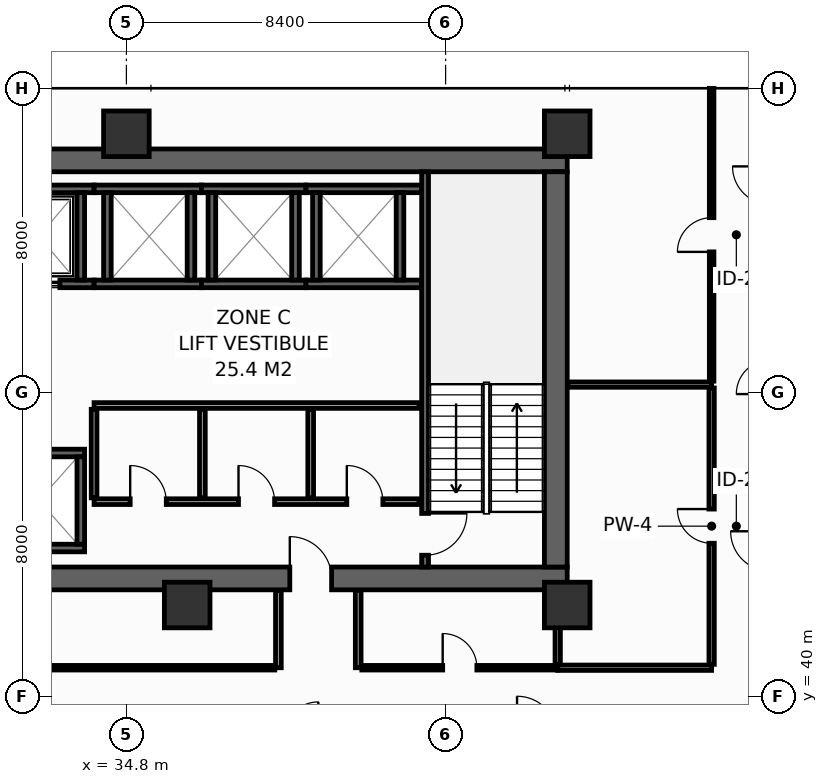
"""IFC4 building model, lengths in metres.
Left out: names, types, materials, properties, quantities, classifications, styles, units other than length and angle.
Written with IfcOpenShell. Run it as: python <this file> out.ifc"""

import sys

from ifc_helpers import new_model, si_unit, direction, frame, frame_2d, origin, origin_2d, place, context, subcontext, project, spatial, rectangle, hollow_rectangle, extrude, element, fill, save


model = new_model("IFC4")
c1 = context("Model", 3, precision=1e-05, world=origin(), true_north=direction((0.0, 1.0)))
c2 = subcontext(c1, "Body", "Model", "MODEL_VIEW")
j1 = project(units=[si_unit("LENGTHUNIT", "METRE"), si_unit("PLANEANGLEUNIT", "RADIAN")], contexts=[c1])
p1 = place(None, origin())
s1 = spatial("IfcSite", under=j1, at=p1, CompositionType="ELEMENT")
p2 = place(p1, origin())
s2 = spatial("IfcBuilding", under=s1, at=p2, CompositionType="ELEMENT")
p3 = place(p2, frame((0.0, 0.0, 38.4)))
s3 = spatial("IfcBuildingStorey", under=s2, at=p3, CompositionType="ELEMENT", Elevation=38.4)
p4 = place(p3, frame((13.5, 43.1, 0.0), z_axis=(0.0, 0.0, 1.0), x_axis=(1.0, 0.0, 0.0)))
e1 = element("IfcWall", 1, at=p4, inside=s3, PredefinedType="SHEAR", context=c2, shape_type="SweptSolid", body=[
    extrude(rectangle(XDim=32.9, YDim=0.6, at=frame_2d((16.45, 0.0))), origin(), (0.0, 0.0, 1.0), 4.15),
])
p5 = place(p4, frame((5.4, 0.0, 0.0)))
e2 = element("IfcOpeningElement", 2, at=p5, cuts=e1, PredefinedType="OPENING", context=c2, shape_type="SweptSolid", body=[
    extrude(rectangle(XDim=1.1, YDim=2.15, at=frame_2d((0.55, 1.075))), frame((0.0, 0.31, 0.0), z_axis=(0.0, -1.0, 0.0), x_axis=(1.0, 0.0, 0.0)), (0.0, 0.0, 1.0), 0.62),
])
p6 = place(p4, frame((25.6, 0.0, 0.0)))
e3 = element("IfcOpeningElement", 3, at=p6, cuts=e1, PredefinedType="OPENING", context=c2, shape_type="SweptSolid", body=[
    extrude(rectangle(XDim=1.1, YDim=2.15, at=frame_2d((0.55, 1.075))), frame((0.0, 0.31, 0.0), z_axis=(0.0, -1.0, 0.0), x_axis=(1.0, 0.0, 0.0)), (0.0, 0.0, 1.0), 0.62),
])
p7 = place(p3, frame((13.5, 54.1, 0.0), z_axis=(0.0, 0.0, 1.0), x_axis=(1.0, 0.0, 0.0)))
e4 = element("IfcWall", 4, at=p7, inside=s3, PredefinedType="SHEAR", context=c2, shape_type="SweptSolid", body=[
    extrude(rectangle(XDim=32.9, YDim=0.6, at=frame_2d((16.45, 0.0))), origin(), (0.0, 0.0, 1.0), 4.15),
])
p8 = place(p3, frame((46.1, 43.4, 0.0), z_axis=(0.0, 0.0, 1.0), x_axis=(0.0, 1.0, 0.0)))
e5 = element("IfcWall", 5, at=p8, inside=s3, PredefinedType="SHEAR", context=c2, shape_type="SweptSolid", body=[
    extrude(rectangle(XDim=10.4, YDim=0.6, at=frame_2d((5.2, 0.0))), origin(), (0.0, 0.0, 1.0), 4.15),
])
for number, where, z_axis, x_axis in (
    (6, (34.8, 54.8, 0.0), (0.0, 0.0, 1.0), (1.0, 0.0, 0.0)),
    (7, (46.4, 54.8, 0.0), (0.0, 0.0, 1.0), (1.0, 0.0, 0.0)),
    (8, (36.4, 42.4, 0.0), (0.0, 0.0, 1.0), (1.0, 0.0, 0.0)),
    (9, (46.4, 42.4, 0.0), (0.0, 0.0, 1.0), (1.0, 0.0, 0.0)),
):
    element("IfcColumn", number, at=place(p3, frame(where, z_axis=z_axis, x_axis=x_axis)), inside=s3, PredefinedType="COLUMN", context=c2, shape_type="SweptSolid", body=[
        extrude(hollow_rectangle(XDim=1.2, YDim=1.2, WallThickness=0.055, at=origin_2d()), origin(), (0.0, 0.0, 1.0), 4.4),
    ])
p9 = place(p3, frame((31.125, 50.85, 0.0), z_axis=(0.0, 0.0, 1.0), x_axis=(1.0, 0.0, 0.0)))
e10 = element("IfcWall", 10, at=p9, inside=s3, PredefinedType="SHEAR", context=c2, shape_type="SweptSolid", body=[
    extrude(rectangle(XDim=2.825, YDim=0.2, at=frame_2d((1.413, 0.0))), origin(), (0.0, 0.0, 1.0), 4.15),
])
p10 = place(p9, frame((0.825, 0.0, 0.0)))
e11 = element("IfcOpeningElement", 11, at=p10, cuts=e10, PredefinedType="OPENING", context=c2, shape_type="SweptSolid", body=[
    extrude(rectangle(XDim=1.1, YDim=2.2, at=frame_2d((0.55, 1.1))), frame((0.0, 0.11, 0.0), z_axis=(0.0, -1.0, 0.0), x_axis=(1.0, 0.0, 0.0)), (0.0, 0.0, 1.0), 0.22),
])
p11 = place(p3, frame((31.125, 53.35, 0.0), z_axis=(0.0, 0.0, 1.0), x_axis=(1.0, 0.0, 0.0)))
e12 = element("IfcWall", 12, at=p11, inside=s3, PredefinedType="SHEAR", context=c2, shape_type="SweptSolid", body=[
    extrude(rectangle(XDim=2.825, YDim=0.2, at=frame_2d((1.413, 0.0))), origin(), (0.0, 0.0, 1.0), 4.15),
])
p12 = place(p3, frame((33.6, 50.95, 0.0), z_axis=(0.0, 0.0, 1.0), x_axis=(0.0, 1.0, 0.0)))
e13 = element("IfcWall", 13, at=p12, inside=s3, PredefinedType="SHEAR", context=c2, shape_type="SweptSolid", body=[
    extrude(rectangle(XDim=2.3, YDim=0.2, at=frame_2d((1.15, 0.0))), origin(), (0.0, 0.0, 1.0), 4.15),
])
for number, where, z_axis, x_axis in (
    (14, (31.125, 43.9, 0.0), (0.0, 0.0, 1.0), (1.0, 0.0, 0.0)),
    (15, (31.125, 46.4, 0.0), (0.0, 0.0, 1.0), (1.0, 0.0, 0.0)),
):
    element("IfcWall", number, at=place(p3, frame(where, z_axis=z_axis, x_axis=x_axis)), inside=s3, PredefinedType="SHEAR", context=c2, shape_type="SweptSolid", body=[
        extrude(rectangle(XDim=2.575, YDim=0.2, at=frame_2d((1.288, 0.0))), origin(), (0.0, 0.0, 1.0), 4.15),
    ])
p13 = place(p3, frame((33.6, 44.0, 0.0), z_axis=(0.0, 0.0, 1.0), x_axis=(0.0, 1.0, 0.0)))
e16 = element("IfcWall", 16, at=p13, inside=s3, PredefinedType="SHEAR", context=c2, shape_type="SweptSolid", body=[
    extrude(rectangle(XDim=2.3, YDim=0.2, at=frame_2d((1.15, 0.0))), origin(), (0.0, 0.0, 1.0), 4.15),
])
for number, where, z_axis, x_axis in (
    (17, (33.95, 50.85, 0.0), (0.0, 0.0, 1.0), (1.0, 0.0, 0.0)),
    (18, (33.95, 53.35, 0.0), (0.0, 0.0, 1.0), (1.0, 0.0, 0.0)),
):
    element("IfcWall", number, at=place(p3, frame(where, z_axis=z_axis, x_axis=x_axis)), inside=s3, PredefinedType="SHEAR", context=c2, shape_type="SweptSolid", body=[
        extrude(rectangle(XDim=2.825, YDim=0.2, at=frame_2d((1.413, 0.0))), origin(), (0.0, 0.0, 1.0), 4.15),
    ])
for number, where, z_axis, x_axis in (
    (19, (34.3, 50.95, 0.0), (0.0, 0.0, 1.0), (0.0, 1.0, 0.0)),
    (20, (36.5, 50.95, 0.0), (0.0, 0.0, 1.0), (0.0, 1.0, 0.0)),
):
    element("IfcWall", number, at=place(p3, frame(where, z_axis=z_axis, x_axis=x_axis)), inside=s3, PredefinedType="SHEAR", context=c2, shape_type="SweptSolid", body=[
        extrude(rectangle(XDim=2.3, YDim=0.2, at=frame_2d((1.15, 0.0))), origin(), (0.0, 0.0, 1.0), 4.15),
    ])
for number, where, z_axis, x_axis in (
    (21, (36.775, 50.85, 0.0), (0.0, 0.0, 1.0), (1.0, 0.0, 0.0)),
    (22, (36.775, 53.35, 0.0), (0.0, 0.0, 1.0), (1.0, 0.0, 0.0)),
):
    element("IfcWall", number, at=place(p3, frame(where, z_axis=z_axis, x_axis=x_axis)), inside=s3, PredefinedType="SHEAR", context=c2, shape_type="SweptSolid", body=[
        extrude(rectangle(XDim=2.75, YDim=0.2, at=frame_2d((1.375, 0.0))), origin(), (0.0, 0.0, 1.0), 4.15),
    ])
for number, where, z_axis, x_axis in (
    (23, (37.05, 50.95, 0.0), (0.0, 0.0, 1.0), (0.0, 1.0, 0.0)),
    (24, (39.25, 50.95, 0.0), (0.0, 0.0, 1.0), (0.0, 1.0, 0.0)),
):
    element("IfcWall", number, at=place(p3, frame(where, z_axis=z_axis, x_axis=x_axis)), inside=s3, PredefinedType="SHEAR", context=c2, shape_type="SweptSolid", body=[
        extrude(rectangle(XDim=2.3, YDim=0.2, at=frame_2d((1.15, 0.0))), origin(), (0.0, 0.0, 1.0), 4.15),
    ])
for number, where, z_axis, x_axis in (
    (25, (39.525, 50.85, 0.0), (0.0, 0.0, 1.0), (1.0, 0.0, 0.0)),
    (26, (39.525, 53.35, 0.0), (0.0, 0.0, 1.0), (1.0, 0.0, 0.0)),
):
    element("IfcWall", number, at=place(p3, frame(where, z_axis=z_axis, x_axis=x_axis)), inside=s3, PredefinedType="SHEAR", context=c2, shape_type="SweptSolid", body=[
        extrude(rectangle(XDim=3.045, YDim=0.2, at=frame_2d((1.522, 0.0))), origin(), (0.0, 0.0, 1.0), 4.15),
    ])
for number, where, z_axis, x_axis in (
    (27, (39.8, 50.95, 0.0), (0.0, 0.0, 1.0), (0.0, 1.0, 0.0)),
    (28, (42.0, 50.95, 0.0), (0.0, 0.0, 1.0), (0.0, 1.0, 0.0)),
):
    element("IfcWall", number, at=place(p3, frame(where, z_axis=z_axis, x_axis=x_axis)), inside=s3, PredefinedType="SHEAR", context=c2, shape_type="SweptSolid", body=[
        extrude(rectangle(XDim=2.3, YDim=0.2, at=frame_2d((1.15, 0.0))), origin(), (0.0, 0.0, 1.0), 4.15),
    ])
p14 = place(p3, frame((42.66, 53.8, 0.0), z_axis=(0.0, 0.0, 1.0), x_axis=(0.0, -1.0, 0.0)))
e29 = element("IfcWall", 29, at=p14, inside=s3, PredefinedType="SHEAR", context=c2, shape_type="SweptSolid", body=[
    extrude(rectangle(XDim=10.4, YDim=0.18, at=frame_2d((5.2, 0.0))), origin(), (0.0, 0.0, 1.0), 4.15),
])
p15 = place(p14, frame((8.99, 0.0, 0.0)))
e30 = element("IfcOpeningElement", 30, at=p15, cuts=e29, PredefinedType="OPENING", context=c2, shape_type="SweptSolid", body=[
    extrude(rectangle(XDim=1.1, YDim=2.15, at=frame_2d((0.55, 1.075))), frame((0.0, 0.1, 0.0), z_axis=(0.0, -1.0, 0.0), x_axis=(1.0, 0.0, 0.0)), (0.0, 0.0, 1.0), 0.2),
])
p16 = place(p3, frame((33.95, 45.12, 0.0), z_axis=(0.0, 0.0, 1.0), x_axis=(1.0, 0.0, 0.0)))
e31 = element("IfcWall", 31, at=p16, inside=s3, PredefinedType="PARTITIONING", context=c2, shape_type="SweptSolid", body=[
    extrude(rectangle(XDim=8.55, YDim=0.15, at=frame_2d((4.275, 0.0))), origin(), (0.0, 0.0, 1.0), 4.15),
])
p17 = place(p16, frame((0.95, 0.0, 0.0)))
e32 = element("IfcOpeningElement", 32, at=p17, cuts=e31, PredefinedType="OPENING", context=c2, shape_type="SweptSolid", body=[
    extrude(rectangle(XDim=0.95, YDim=2.15, at=frame_2d((0.475, 1.075))), frame((0.0, 0.085, 0.0), z_axis=(0.0, -1.0, 0.0), x_axis=(1.0, 0.0, 0.0)), (0.0, 0.0, 1.0), 0.17),
])
p18 = place(p16, frame((3.8, 0.0, 0.0)))
e33 = element("IfcOpeningElement", 33, at=p18, cuts=e31, PredefinedType="OPENING", context=c2, shape_type="SweptSolid", body=[
    extrude(rectangle(XDim=0.95, YDim=2.15, at=frame_2d((0.475, 1.075))), frame((0.0, 0.085, 0.0), z_axis=(0.0, -1.0, 0.0), x_axis=(1.0, 0.0, 0.0)), (0.0, 0.0, 1.0), 0.17),
])
p19 = place(p16, frame((6.65, 0.0, 0.0)))
e34 = element("IfcOpeningElement", 34, at=p19, cuts=e31, PredefinedType="OPENING", context=c2, shape_type="SweptSolid", body=[
    extrude(rectangle(XDim=0.95, YDim=2.15, at=frame_2d((0.475, 1.075))), frame((0.0, 0.085, 0.0), z_axis=(0.0, -1.0, 0.0), x_axis=(1.0, 0.0, 0.0)), (0.0, 0.0, 1.0), 0.17),
])
p20 = place(p3, frame((33.95, 47.65, 0.0), z_axis=(0.0, 0.0, 1.0), x_axis=(1.0, 0.0, 0.0)))
e35 = element("IfcWall", 35, at=p20, inside=s3, PredefinedType="PARTITIONING", context=c2, shape_type="SweptSolid", body=[
    extrude(rectangle(XDim=8.55, YDim=0.15, at=frame_2d((4.275, 0.0))), origin(), (0.0, 0.0, 1.0), 4.15),
])
for number, where, z_axis, x_axis in (
    (36, (33.95, 45.22, 0.0), (0.0, 0.0, 1.0), (0.0, 1.0, 0.0)),
    (37, (36.8, 45.22, 0.0), (0.0, 0.0, 1.0), (0.0, 1.0, 0.0)),
    (38, (39.65, 45.22, 0.0), (0.0, 0.0, 1.0), (0.0, 1.0, 0.0)),
):
    element("IfcWall", number, at=place(p3, frame(where, z_axis=z_axis, x_axis=x_axis)), inside=s3, PredefinedType="PARTITIONING", context=c2, shape_type="SweptSolid", body=[
        extrude(rectangle(XDim=2.33, YDim=0.15, at=frame_2d((1.165, 0.0))), origin(), (0.0, 0.0, 1.0), 4.15),
    ])
p21 = place(p3, frame((46.15, 40.75, 0.0), z_axis=(0.0, 0.0, 1.0), x_axis=(1.0, 0.0, 0.0)))
e39 = element("IfcWall", 39, at=p21, inside=s3, PredefinedType="PARTITIONING", context=c2, shape_type="SweptSolid", body=[
    extrude(rectangle(XDim=4.05, YDim=0.14, at=frame_2d((2.025, 0.0))), origin(), (0.0, 0.0, 1.0), 4.15),
])
p22 = place(p3, frame((46.15, 40.84, 0.0), z_axis=(0.0, 0.0, 1.0), x_axis=(0.0, 1.0, 0.0)))
e40 = element("IfcWall", 40, at=p22, inside=s3, PredefinedType="PARTITIONING", context=c2, shape_type="SweptSolid", body=[
    extrude(rectangle(XDim=1.94, YDim=0.14, at=frame_2d((0.97, 0.0))), origin(), (0.0, 0.0, 1.0), 4.15),
])
p23 = place(p3, frame((46.42, 48.2, 0.0), z_axis=(0.0, 0.0, 1.0), x_axis=(1.0, 0.0, 0.0)))
e41 = element("IfcWall", 41, at=p23, inside=s3, PredefinedType="PARTITIONING", context=c2, shape_type="SweptSolid", body=[
    extrude(rectangle(XDim=3.78, YDim=0.14, at=frame_2d((1.89, 0.0))), origin(), (0.0, 0.0, 1.0), 4.15),
])
p24 = place(p3, frame((50.2, 40.84, 0.0), z_axis=(0.0, 0.0, 1.0), x_axis=(0.0, 1.0, 0.0)))
e42 = element("IfcWall", 42, at=p24, inside=s3, PredefinedType="PARTITIONING", context=c2, shape_type="SweptSolid", body=[
    extrude(rectangle(XDim=7.27, YDim=0.14, at=frame_2d((3.635, 0.0))), origin(), (0.0, 0.0, 1.0), 3.335),
])
p25 = place(p24, frame((3.185, 0.0, 0.0)))
e43 = element("IfcOpeningElement", 43, at=p25, cuts=e42, PredefinedType="OPENING", context=c2, shape_type="SweptSolid", body=[
    extrude(rectangle(XDim=0.9, YDim=2.1, at=frame_2d((0.45, 1.05))), frame((0.0, 0.08, 0.0), z_axis=(0.0, -1.0, 0.0), x_axis=(1.0, 0.0, 0.0)), (0.0, 0.0, 1.0), 0.16),
])
p26 = place(p3, frame((50.2, 48.29, 0.0), z_axis=(0.0, 0.0, 1.0), x_axis=(0.0, 1.0, 0.0)))
e44 = element("IfcWall", 44, at=p26, inside=s3, PredefinedType="PARTITIONING", context=c2, shape_type="SweptSolid", body=[
    extrude(rectangle(XDim=7.705, YDim=0.12, at=frame_2d((3.853, 0.0))), origin(), (0.0, 0.0, 1.0), 3.435),
])
p27 = place(p26, frame((3.402, 0.0, 0.0)))
e45 = element("IfcOpeningElement", 45, at=p27, cuts=e44, PredefinedType="OPENING", context=c2, shape_type="SweptSolid", body=[
    extrude(rectangle(XDim=0.9, YDim=2.1, at=frame_2d((0.45, 1.05))), frame((0.0, 0.07, 0.0), z_axis=(0.0, -1.0, 0.0), x_axis=(1.0, 0.0, 0.0)), (0.0, 0.0, 1.0), 0.14),
])
for number, where, z_axis, x_axis in (
    (46, (38.8, 40.75, 0.0), (0.0, 0.0, 1.0), (0.0, 1.0, 0.0)),
    (47, (40.9, 40.75, 0.0), (0.0, 0.0, 1.0), (0.0, 1.0, 0.0)),
):
    element("IfcWall", number, at=place(p3, frame(where, z_axis=z_axis, x_axis=x_axis)), inside=s3, PredefinedType="PARTITIONING", context=c2, shape_type="SweptSolid", body=[
        extrude(rectangle(XDim=2.03, YDim=0.15, at=frame_2d((1.015, 0.0))), origin(), (0.0, 0.0, 1.0), 4.15),
    ])
p28 = place(p3, frame((20.795, 40.75, 0.0), z_axis=(0.0, 0.0, 1.0), x_axis=(1.0, 0.0, 0.0)))
e48 = element("IfcWall", 48, at=p28, inside=s3, PredefinedType="PARTITIONING", context=c2, shape_type="SweptSolid", body=[
    extrude(rectangle(XDim=17.91, YDim=0.12, at=frame_2d((8.955, 0.0))), origin(), (0.0, 0.0, 1.0), 3.335),
])
p29 = place(p28, frame((8.505, 0.0, 0.0)))
e49 = element("IfcOpeningElement", 49, at=p29, cuts=e48, PredefinedType="OPENING", context=c2, shape_type="SweptSolid", body=[
    extrude(rectangle(XDim=0.9, YDim=2.1, at=frame_2d((0.45, 1.05))), frame((0.0, 0.07, 0.0), z_axis=(0.0, -1.0, 0.0), x_axis=(1.0, 0.0, 0.0)), (0.0, 0.0, 1.0), 0.14),
])
p30 = place(p3, frame((40.995, 40.75, 0.0), z_axis=(0.0, 0.0, 1.0), x_axis=(1.0, 0.0, 0.0)))
e50 = element("IfcWall", 50, at=p30, inside=s3, PredefinedType="PARTITIONING", context=c2, shape_type="SweptSolid", body=[
    extrude(rectangle(XDim=5.155, YDim=0.12, at=frame_2d((2.577, 0.0))), origin(), (0.0, 0.0, 1.0), 4.15),
])
p31 = place(p30, frame((2.128, 0.0, 0.0)))
e51 = element("IfcOpeningElement", 51, at=p31, cuts=e50, PredefinedType="OPENING", context=c2, shape_type="SweptSolid", body=[
    extrude(rectangle(XDim=0.9, YDim=2.1, at=frame_2d((0.45, 1.05))), frame((0.0, 0.07, 0.0), z_axis=(0.0, -1.0, 0.0), x_axis=(1.0, 0.0, 0.0)), (0.0, 0.0, 1.0), 0.14),
])
p32 = place(p10, origin())
e52 = element("IfcDoor", 52, at=p32, inside=s3, OperationType="SLIDING_TO_LEFT", PredefinedType="DOOR", context=c2, shape_type="SweptSolid", body=[
    extrude(rectangle(XDim=1.1, YDim=2.2, at=frame_2d((0.55, 1.1))), frame((0.0, 0.025, 0.0), z_axis=(0.0, -1.0, 0.0), x_axis=(1.0, 0.0, 0.0)), (0.0, 0.0, 1.0), 0.05),
])
fill(e11, e52)
p33 = place(p15, origin())
e53 = element("IfcDoor", 53, at=p33, inside=s3, OperationType="SINGLE_SWING_LEFT", PredefinedType="DOOR", context=c2, shape_type="SweptSolid", body=[
    extrude(rectangle(XDim=1.1, YDim=2.15, at=frame_2d((0.55, 1.075))), frame((0.0, 0.025, 0.0), z_axis=(0.0, -1.0, 0.0), x_axis=(1.0, 0.0, 0.0)), (0.0, 0.0, 1.0), 0.05),
])
fill(e30, e53)
p34 = place(p6, origin())
e54 = element("IfcDoor", 54, at=p34, inside=s3, OperationType="SINGLE_SWING_LEFT", PredefinedType="DOOR", context=c2, shape_type="SweptSolid", body=[
    extrude(rectangle(XDim=1.1, YDim=2.15, at=frame_2d((0.55, 1.075))), frame((0.0, 0.025, 0.0), z_axis=(0.0, -1.0, 0.0), x_axis=(1.0, 0.0, 0.0)), (0.0, 0.0, 1.0), 0.05),
])
fill(e3, e54)
p35 = place(p17, origin())
e55 = element("IfcDoor", 55, at=p35, inside=s3, OperationType="SINGLE_SWING_LEFT", PredefinedType="DOOR", context=c2, shape_type="SweptSolid", body=[
    extrude(rectangle(XDim=0.95, YDim=2.15, at=frame_2d((0.475, 1.075))), frame((0.0, 0.025, 0.0), z_axis=(0.0, -1.0, 0.0), x_axis=(1.0, 0.0, 0.0)), (0.0, 0.0, 1.0), 0.05),
])
fill(e32, e55)
p36 = place(p18, origin())
e56 = element("IfcDoor", 56, at=p36, inside=s3, OperationType="SINGLE_SWING_LEFT", PredefinedType="DOOR", context=c2, shape_type="SweptSolid", body=[
    extrude(rectangle(XDim=0.95, YDim=2.15, at=frame_2d((0.475, 1.075))), frame((0.0, 0.025, 0.0), z_axis=(0.0, -1.0, 0.0), x_axis=(1.0, 0.0, 0.0)), (0.0, 0.0, 1.0), 0.05),
])
fill(e33, e56)
p37 = place(p19, origin())
e57 = element("IfcDoor", 57, at=p37, inside=s3, OperationType="SINGLE_SWING_LEFT", PredefinedType="DOOR", context=c2, shape_type="SweptSolid", body=[
    extrude(rectangle(XDim=0.95, YDim=2.15, at=frame_2d((0.475, 1.075))), frame((0.0, 0.025, 0.0), z_axis=(0.0, -1.0, 0.0), x_axis=(1.0, 0.0, 0.0)), (0.0, 0.0, 1.0), 0.05),
])
fill(e34, e57)
p38 = place(p25, origin())
e58 = element("IfcDoor", 58, at=p38, inside=s3, OperationType="SINGLE_SWING_RIGHT", PredefinedType="DOOR", context=c2, shape_type="SweptSolid", body=[
    extrude(rectangle(XDim=0.9, YDim=2.1, at=frame_2d((0.45, 1.05))), frame((0.0, 0.025, 0.0), z_axis=(0.0, -1.0, 0.0), x_axis=(1.0, 0.0, 0.0)), (0.0, 0.0, 1.0), 0.05),
])
fill(e43, e58)
p39 = place(p27, origin())
e59 = element("IfcDoor", 59, at=p39, inside=s3, OperationType="SINGLE_SWING_LEFT", PredefinedType="DOOR", context=c2, shape_type="SweptSolid", body=[
    extrude(rectangle(XDim=0.9, YDim=2.1, at=frame_2d((0.45, 1.05))), frame((0.0, 0.025, 0.0), z_axis=(0.0, -1.0, 0.0), x_axis=(1.0, 0.0, 0.0)), (0.0, 0.0, 1.0), 0.05),
])
fill(e45, e59)
p40 = place(p31, origin())
e60 = element("IfcDoor", 60, at=p40, inside=s3, OperationType="SINGLE_SWING_LEFT", PredefinedType="DOOR", context=c2, shape_type="SweptSolid", body=[
    extrude(rectangle(XDim=0.9, YDim=2.1, at=frame_2d((0.45, 1.05))), frame((0.0, 0.025, 0.0), z_axis=(0.0, -1.0, 0.0), x_axis=(1.0, 0.0, 0.0)), (0.0, 0.0, 1.0), 0.05),
])
fill(e51, e60)
save(model, sys.argv[1])
